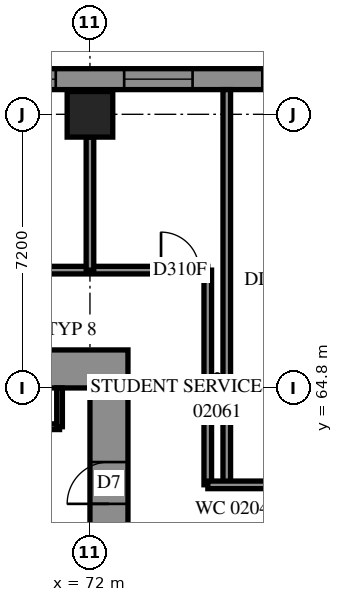
"""IFC4 building model, lengths in metres.
Left out: names, types, materials, properties, quantities, classifications, styles, units other than length and angle.
Written with IfcOpenShell. Run it as: python <this file> out.ifc"""

import sys

from ifc_helpers import new_model, si_unit, direction, frame, frame_2d, origin, origin_2d, place, context, subcontext, project, spatial, polyline, rectangle, outline, extrude, element, fill, save


model = new_model("IFC4")
c1 = context("Model", 3, precision=1e-05, world=origin(), true_north=direction((0.0, 1.0)))
c2 = subcontext(c1, "Body", "Model", "MODEL_VIEW")
j1 = project(units=[si_unit("LENGTHUNIT", "METRE"), si_unit("PLANEANGLEUNIT", "RADIAN")], contexts=[c1])
p1 = place(None, origin())
s1 = spatial("IfcSite", under=j1, at=p1, CompositionType="ELEMENT")
p2 = place(p1, origin())
s2 = spatial("IfcBuilding", under=s1, at=p2, CompositionType="ELEMENT")
p3 = place(p2, frame((0.0, 0.0, 10.2)))
s3 = spatial("IfcBuildingStorey", under=s2, at=p3, CompositionType="ELEMENT", Elevation=10.2)
p4 = place(p3, frame((72.0, 72.0, 0.0), z_axis=(0.0, 0.0, 1.0), x_axis=(1.0, 0.0, 0.0)))
e1 = element("IfcColumn", 1, at=p4, inside=s3, PredefinedType="COLUMN", context=c2, shape_type="SweptSolid", body=[
    extrude(rectangle(XDim=1.2, YDim=1.2, at=origin_2d()), origin(), (0.0, 0.0, 1.0), 3.8),
])
p5 = place(p3, frame((56.6, 65.3, -0.4), z_axis=(0.0, 0.0, 1.0), x_axis=(1.0, 0.0, 0.0)))
e2 = element("IfcWall", 2, at=p5, inside=s3, PredefinedType="SHEAR", context=c2, shape_type="SweptSolid", body=[
    extrude(rectangle(XDim=16.4, YDim=1.0, at=frame_2d((8.2, 0.0))), origin(), (0.0, 0.0, 1.0), 3.5),
])
p6 = place(p5, frame((11.0, 0.0, 0.4)))
e3 = element("IfcOpeningElement", 3, at=p6, cuts=e2, PredefinedType="OPENING", context=c2, shape_type="SweptSolid", body=[
    extrude(rectangle(XDim=0.8, YDim=2.1, at=frame_2d((0.4, 1.05))), frame((0.0, 0.51, 0.0), z_axis=(0.0, -1.0, 0.0), x_axis=(1.0, 0.0, 0.0)), (0.0, 0.0, 1.0), 1.02),
])
p7 = place(p3, frame((72.5, 50.4, -0.4), z_axis=(0.0, 0.0, 1.0), x_axis=(0.0, 1.0, 0.0)))
e4 = element("IfcWall", 4, at=p7, inside=s3, PredefinedType="SHEAR", context=c2, shape_type="SweptSolid", body=[
    extrude(rectangle(XDim=14.4, YDim=1.0, at=frame_2d((7.2, 0.0))), origin(), (0.0, 0.0, 1.0), 3.5),
])
p8 = place(p7, frame((4.55, 0.0, 0.4)))
e5 = element("IfcOpeningElement", 5, at=p8, cuts=e4, PredefinedType="OPENING", context=c2, shape_type="SweptSolid", body=[
    extrude(rectangle(XDim=1.1, YDim=2.1, at=frame_2d((0.55, 1.05))), frame((0.0, 0.51, 0.0), z_axis=(0.0, -1.0, 0.0), x_axis=(1.0, 0.0, 0.0)), (0.0, 0.0, 1.0), 1.02),
])
p9 = place(p7, frame((11.35, 0.0, 0.4)))
e6 = element("IfcOpeningElement", 6, at=p9, cuts=e4, PredefinedType="OPENING", context=c2, shape_type="SweptSolid", body=[
    extrude(rectangle(XDim=1.1, YDim=2.1, at=frame_2d((0.55, 1.05))), frame((0.0, 0.51, 0.0), z_axis=(0.0, -1.0, 0.0), x_axis=(1.0, 0.0, 0.0)), (0.0, 0.0, 1.0), 1.02),
])
p10 = place(p3, frame((79.583, 72.925, 0.0), z_axis=(0.0, 0.0, 1.0), x_axis=(-1.0, 0.0, 0.0)))
e7 = element("IfcWall", 7, at=p10, inside=s3, PredefinedType="SOLIDWALL", context=c2, shape_type="SweptSolid", body=[
    extrude(outline(polyline([(-0.114, -0.275), (79.583, -0.275), (79.033, 0.275), (0.114, 0.275), (-0.114, -0.275)])), origin(), (0.0, 0.0, 1.0), 3.8),
])
p11 = place(p10, frame((1.249, 0.0, 0.7)))
e8 = element("IfcOpeningElement", 8, at=p11, cuts=e7, PredefinedType="OPENING", context=c2, shape_type="SweptSolid", body=[
    extrude(rectangle(XDim=1.8, YDim=2.6, at=frame_2d((0.9, 1.3))), frame((0.0, 0.285, 0.0), z_axis=(0.0, -1.0, 0.0), x_axis=(1.0, 0.0, 0.0)), (0.0, 0.0, 1.0), 0.57),
])
p12 = place(p10, frame((4.883, 0.0, 0.7)))
e9 = element("IfcOpeningElement", 9, at=p12, cuts=e7, PredefinedType="OPENING", context=c2, shape_type="SweptSolid", body=[
    extrude(rectangle(XDim=1.8, YDim=2.6, at=frame_2d((0.9, 1.3))), frame((0.0, 0.285, 0.0), z_axis=(0.0, -1.0, 0.0), x_axis=(1.0, 0.0, 0.0)), (0.0, 0.0, 1.0), 0.57),
])
p13 = place(p10, frame((8.483, 0.0, 0.7)))
e10 = element("IfcOpeningElement", 10, at=p13, cuts=e7, PredefinedType="OPENING", context=c2, shape_type="SweptSolid", body=[
    extrude(rectangle(XDim=1.8, YDim=2.6, at=frame_2d((0.9, 1.3))), frame((0.0, 0.285, 0.0), z_axis=(0.0, -1.0, 0.0), x_axis=(1.0, 0.0, 0.0)), (0.0, 0.0, 1.0), 0.57),
])
p14 = place(p10, frame((12.083, 0.0, 0.7)))
e11 = element("IfcOpeningElement", 11, at=p14, cuts=e7, PredefinedType="OPENING", context=c2, shape_type="SweptSolid", body=[
    extrude(rectangle(XDim=1.8, YDim=2.6, at=frame_2d((0.9, 1.3))), frame((0.0, 0.285, 0.0), z_axis=(0.0, -1.0, 0.0), x_axis=(1.0, 0.0, 0.0)), (0.0, 0.0, 1.0), 0.57),
])
p15 = place(p10, frame((15.683, 0.0, 0.7)))
e12 = element("IfcOpeningElement", 12, at=p15, cuts=e7, PredefinedType="OPENING", context=c2, shape_type="SweptSolid", body=[
    extrude(rectangle(XDim=1.8, YDim=2.6, at=frame_2d((0.9, 1.3))), frame((0.0, 0.285, 0.0), z_axis=(0.0, -1.0, 0.0), x_axis=(1.0, 0.0, 0.0)), (0.0, 0.0, 1.0), 0.57),
])
p16 = place(p10, frame((19.283, 0.0, 0.7)))
e13 = element("IfcOpeningElement", 13, at=p16, cuts=e7, PredefinedType="OPENING", context=c2, shape_type="SweptSolid", body=[
    extrude(rectangle(XDim=1.8, YDim=2.6, at=frame_2d((0.9, 1.3))), frame((0.0, 0.285, 0.0), z_axis=(0.0, -1.0, 0.0), x_axis=(1.0, 0.0, 0.0)), (0.0, 0.0, 1.0), 0.57),
])
p17 = place(p10, frame((22.883, 0.0, 0.7)))
e14 = element("IfcOpeningElement", 14, at=p17, cuts=e7, PredefinedType="OPENING", context=c2, shape_type="SweptSolid", body=[
    extrude(rectangle(XDim=1.8, YDim=2.6, at=frame_2d((0.9, 1.3))), frame((0.0, 0.285, 0.0), z_axis=(0.0, -1.0, 0.0), x_axis=(1.0, 0.0, 0.0)), (0.0, 0.0, 1.0), 0.57),
])
p18 = place(p10, frame((26.483, 0.0, 0.7)))
e15 = element("IfcOpeningElement", 15, at=p18, cuts=e7, PredefinedType="OPENING", context=c2, shape_type="SweptSolid", body=[
    extrude(rectangle(XDim=1.8, YDim=2.6, at=frame_2d((0.9, 1.3))), frame((0.0, 0.285, 0.0), z_axis=(0.0, -1.0, 0.0), x_axis=(1.0, 0.0, 0.0)), (0.0, 0.0, 1.0), 0.57),
])
p19 = place(p10, frame((30.083, 0.0, 0.7)))
e16 = element("IfcOpeningElement", 16, at=p19, cuts=e7, PredefinedType="OPENING", context=c2, shape_type="SweptSolid", body=[
    extrude(rectangle(XDim=1.8, YDim=2.6, at=frame_2d((0.9, 1.3))), frame((0.0, 0.285, 0.0), z_axis=(0.0, -1.0, 0.0), x_axis=(1.0, 0.0, 0.0)), (0.0, 0.0, 1.0), 0.57),
])
p20 = place(p10, frame((33.683, 0.0, 0.7)))
e17 = element("IfcOpeningElement", 17, at=p20, cuts=e7, PredefinedType="OPENING", context=c2, shape_type="SweptSolid", body=[
    extrude(rectangle(XDim=1.8, YDim=2.6, at=frame_2d((0.9, 1.3))), frame((0.0, 0.285, 0.0), z_axis=(0.0, -1.0, 0.0), x_axis=(1.0, 0.0, 0.0)), (0.0, 0.0, 1.0), 0.57),
])
p21 = place(p10, frame((37.283, 0.0, 0.7)))
e18 = element("IfcOpeningElement", 18, at=p21, cuts=e7, PredefinedType="OPENING", context=c2, shape_type="SweptSolid", body=[
    extrude(rectangle(XDim=1.8, YDim=2.6, at=frame_2d((0.9, 1.3))), frame((0.0, 0.285, 0.0), z_axis=(0.0, -1.0, 0.0), x_axis=(1.0, 0.0, 0.0)), (0.0, 0.0, 1.0), 0.57),
])
p22 = place(p10, frame((40.883, 0.0, 0.7)))
e19 = element("IfcOpeningElement", 19, at=p22, cuts=e7, PredefinedType="OPENING", context=c2, shape_type="SweptSolid", body=[
    extrude(rectangle(XDim=1.8, YDim=2.6, at=frame_2d((0.9, 1.3))), frame((0.0, 0.285, 0.0), z_axis=(0.0, -1.0, 0.0), x_axis=(1.0, 0.0, 0.0)), (0.0, 0.0, 1.0), 0.57),
])
p23 = place(p10, frame((44.483, 0.0, 0.7)))
e20 = element("IfcOpeningElement", 20, at=p23, cuts=e7, PredefinedType="OPENING", context=c2, shape_type="SweptSolid", body=[
    extrude(rectangle(XDim=1.8, YDim=2.6, at=frame_2d((0.9, 1.3))), frame((0.0, 0.285, 0.0), z_axis=(0.0, -1.0, 0.0), x_axis=(1.0, 0.0, 0.0)), (0.0, 0.0, 1.0), 0.57),
])
p24 = place(p10, frame((48.083, 0.0, 0.7)))
e21 = element("IfcOpeningElement", 21, at=p24, cuts=e7, PredefinedType="OPENING", context=c2, shape_type="SweptSolid", body=[
    extrude(rectangle(XDim=1.8, YDim=2.6, at=frame_2d((0.9, 1.3))), frame((0.0, 0.285, 0.0), z_axis=(0.0, -1.0, 0.0), x_axis=(1.0, 0.0, 0.0)), (0.0, 0.0, 1.0), 0.57),
])
p25 = place(p10, frame((51.683, 0.0, 0.7)))
e22 = element("IfcOpeningElement", 22, at=p25, cuts=e7, PredefinedType="OPENING", context=c2, shape_type="SweptSolid", body=[
    extrude(rectangle(XDim=1.8, YDim=2.6, at=frame_2d((0.9, 1.3))), frame((0.0, 0.285, 0.0), z_axis=(0.0, -1.0, 0.0), x_axis=(1.0, 0.0, 0.0)), (0.0, 0.0, 1.0), 0.57),
])
p26 = place(p10, frame((55.283, 0.0, 0.7)))
e23 = element("IfcOpeningElement", 23, at=p26, cuts=e7, PredefinedType="OPENING", context=c2, shape_type="SweptSolid", body=[
    extrude(rectangle(XDim=1.8, YDim=2.6, at=frame_2d((0.9, 1.3))), frame((0.0, 0.285, 0.0), z_axis=(0.0, -1.0, 0.0), x_axis=(1.0, 0.0, 0.0)), (0.0, 0.0, 1.0), 0.57),
])
p27 = place(p10, frame((58.883, 0.0, 0.7)))
e24 = element("IfcOpeningElement", 24, at=p27, cuts=e7, PredefinedType="OPENING", context=c2, shape_type="SweptSolid", body=[
    extrude(rectangle(XDim=1.8, YDim=2.6, at=frame_2d((0.9, 1.3))), frame((0.0, 0.285, 0.0), z_axis=(0.0, -1.0, 0.0), x_axis=(1.0, 0.0, 0.0)), (0.0, 0.0, 1.0), 0.57),
])
p28 = place(p10, frame((62.483, 0.0, 0.7)))
e25 = element("IfcOpeningElement", 25, at=p28, cuts=e7, PredefinedType="OPENING", context=c2, shape_type="SweptSolid", body=[
    extrude(rectangle(XDim=1.8, YDim=2.6, at=frame_2d((0.9, 1.3))), frame((0.0, 0.285, 0.0), z_axis=(0.0, -1.0, 0.0), x_axis=(1.0, 0.0, 0.0)), (0.0, 0.0, 1.0), 0.57),
])
p29 = place(p10, frame((66.083, 0.0, 0.7)))
e26 = element("IfcOpeningElement", 26, at=p29, cuts=e7, PredefinedType="OPENING", context=c2, shape_type="SweptSolid", body=[
    extrude(rectangle(XDim=1.8, YDim=2.6, at=frame_2d((0.9, 1.3))), frame((0.0, 0.285, 0.0), z_axis=(0.0, -1.0, 0.0), x_axis=(1.0, 0.0, 0.0)), (0.0, 0.0, 1.0), 0.57),
])
p30 = place(p10, frame((69.683, 0.0, 0.7)))
e27 = element("IfcOpeningElement", 27, at=p30, cuts=e7, PredefinedType="OPENING", context=c2, shape_type="SweptSolid", body=[
    extrude(rectangle(XDim=1.8, YDim=2.6, at=frame_2d((0.9, 1.3))), frame((0.0, 0.285, 0.0), z_axis=(0.0, -1.0, 0.0), x_axis=(1.0, 0.0, 0.0)), (0.0, 0.0, 1.0), 0.57),
])
p31 = place(p10, frame((73.683, 0.0, 0.7)))
e28 = element("IfcOpeningElement", 28, at=p31, cuts=e7, PredefinedType="OPENING", context=c2, shape_type="SweptSolid", body=[
    extrude(rectangle(XDim=1.8, YDim=2.6, at=frame_2d((0.9, 1.3))), frame((0.0, 0.285, 0.0), z_axis=(0.0, -1.0, 0.0), x_axis=(1.0, 0.0, 0.0)), (0.0, 0.0, 1.0), 0.57),
])
p32 = place(p10, frame((76.508, 0.0, 0.7)))
e29 = element("IfcOpeningElement", 29, at=p32, cuts=e7, PredefinedType="OPENING", context=c2, shape_type="SweptSolid", body=[
    extrude(rectangle(XDim=1.8, YDim=2.6, at=frame_2d((0.9, 1.3))), frame((0.0, 0.285, 0.0), z_axis=(0.0, -1.0, 0.0), x_axis=(1.0, 0.0, 0.0)), (0.0, 0.0, 1.0), 0.57),
])
p33 = place(p3, frame((64.95, 63.78, 0.0), z_axis=(0.0, 0.0, 1.0), x_axis=(1.0, 0.0, 0.0)))
e30 = element("IfcWall", 30, at=p33, inside=s3, PredefinedType="PARTITIONING", context=c2, shape_type="SweptSolid", body=[
    extrude(rectangle(XDim=6.25, YDim=0.15, at=frame_2d((3.125, 0.0))), origin(), (0.0, 0.0, 1.0), 3.8),
])
p34 = place(p3, frame((71.2, 63.78, 0.0), z_axis=(0.0, 0.0, 1.0), x_axis=(0.0, 1.0, 0.0)))
e31 = element("IfcWall", 31, at=p34, inside=s3, PredefinedType="PARTITIONING", context=c2, shape_type="SweptSolid", body=[
    extrude(rectangle(XDim=1.02, YDim=0.15, at=frame_2d((0.51, 0.0))), origin(), (0.0, 0.0, 1.0), 3.8),
])
p35 = place(p3, frame((54.5, 67.9, 0.0), z_axis=(0.0, 0.0, 1.0), x_axis=(1.0, 0.0, 0.0)))
e32 = element("IfcWall", 32, at=p35, inside=s3, PredefinedType="PARTITIONING", context=c2, shape_type="SweptSolid", body=[
    extrude(rectangle(XDim=20.6, YDim=0.2, at=frame_2d((10.3, 0.0))), origin(), (0.0, 0.0, 1.0), 3.8),
])
p36 = place(p35, frame((0.23, 0.0, 0.0)))
e33 = element("IfcOpeningElement", 33, at=p36, cuts=e32, PredefinedType="OPENING", context=c2, shape_type="SweptSolid", body=[
    extrude(rectangle(XDim=1.0, YDim=2.1, at=frame_2d((0.5, 1.05))), frame((0.0, 0.11, 0.0), z_axis=(0.0, -1.0, 0.0), x_axis=(1.0, 0.0, 0.0)), (0.0, 0.0, 1.0), 0.22),
])
p37 = place(p35, frame((19.37, 0.0, 0.0)))
e34 = element("IfcOpeningElement", 34, at=p37, cuts=e32, PredefinedType="OPENING", context=c2, shape_type="SweptSolid", body=[
    extrude(rectangle(XDim=1.0, YDim=2.1, at=frame_2d((0.5, 1.05))), frame((0.0, 0.11, 0.0), z_axis=(0.0, -1.0, 0.0), x_axis=(1.0, 0.0, 0.0)), (0.0, 0.0, 1.0), 0.22),
])
p38 = place(p35, frame((6.657, 0.0, 0.0)))
e35 = element("IfcOpeningElement", 35, at=p38, cuts=e32, PredefinedType="OPENING", context=c2, shape_type="SweptSolid", body=[
    extrude(rectangle(XDim=1.0, YDim=2.1, at=frame_2d((0.5, 1.05))), frame((0.0, 0.11, 0.0), z_axis=(0.0, -1.0, 0.0), x_axis=(1.0, 0.0, 0.0)), (0.0, 0.0, 1.0), 0.22),
])
p39 = place(p35, frame((13.857, 0.0, 0.0)))
e36 = element("IfcOpeningElement", 36, at=p39, cuts=e32, PredefinedType="OPENING", context=c2, shape_type="SweptSolid", body=[
    extrude(rectangle(XDim=1.0, YDim=2.1, at=frame_2d((0.5, 1.05))), frame((0.0, 0.11, 0.0), z_axis=(0.0, -1.0, 0.0), x_axis=(1.0, 0.0, 0.0)), (0.0, 0.0, 1.0), 0.22),
])
p40 = place(p3, frame((75.6, 62.25, 0.0), z_axis=(0.0, 0.0, 1.0), x_axis=(0.0, 1.0, 0.0)))
e37 = element("IfcWall", 37, at=p40, inside=s3, PredefinedType="PARTITIONING", context=c2, shape_type="SweptSolid", body=[
    extrude(rectangle(XDim=10.4, YDim=0.2, at=frame_2d((5.2, 0.0))), origin(), (0.0, 0.0, 1.0), 3.8),
])
p41 = place(p3, frame((75.1, 62.252, 0.0), z_axis=(0.0, 0.0, 1.0), x_axis=(0.0, 1.0, 0.0)))
e38 = element("IfcWall", 38, at=p41, inside=s3, PredefinedType="PARTITIONING", context=c2, shape_type="SweptSolid", body=[
    extrude(rectangle(XDim=5.648, YDim=0.2, at=frame_2d((2.824, 0.0))), origin(), (0.0, 0.0, 1.0), 3.8),
])
p42 = place(p3, frame((75.102, 62.25, 0.0), z_axis=(0.0, 0.0, 1.0), x_axis=(1.0, 0.0, 0.0)))
e39 = element("IfcWall", 39, at=p42, inside=s3, PredefinedType="PARTITIONING", context=c2, shape_type="SweptSolid", body=[
    extrude(rectangle(XDim=4.098, YDim=0.2, at=frame_2d((2.049, 0.0))), origin(), (0.0, 0.0, 1.0), 3.8),
])
p43 = place(p3, frame((72.0, 67.9, 0.0), z_axis=(0.0, 0.0, 1.0), x_axis=(0.0, 1.0, 0.0)))
e40 = element("IfcWall", 40, at=p43, inside=s3, PredefinedType="PARTITIONING", context=c2, shape_type="SweptSolid", body=[
    extrude(rectangle(XDim=3.5, YDim=0.2, at=frame_2d((1.75, 0.0))), origin(), (0.0, 0.0, 1.0), 3.8),
])
p44 = place(p11, origin())
e41 = element("IfcWindow", 41, at=p44, inside=s3, PartitioningType="SINGLE_PANEL", PredefinedType="WINDOW", context=c2, shape_type="SweptSolid", body=[
    extrude(rectangle(XDim=1.8, YDim=2.6, at=frame_2d((0.9, 1.3))), frame((0.0, 0.155, 0.0), z_axis=(0.0, -1.0, 0.0), x_axis=(1.0, 0.0, 0.0)), (0.0, 0.0, 1.0), 0.06),
])
fill(e8, e41)
p45 = place(p12, origin())
e42 = element("IfcWindow", 42, at=p45, inside=s3, PartitioningType="SINGLE_PANEL", PredefinedType="WINDOW", context=c2, shape_type="SweptSolid", body=[
    extrude(rectangle(XDim=1.8, YDim=2.6, at=frame_2d((0.9, 1.3))), frame((0.0, 0.155, 0.0), z_axis=(0.0, -1.0, 0.0), x_axis=(1.0, 0.0, 0.0)), (0.0, 0.0, 1.0), 0.06),
])
fill(e9, e42)
p46 = place(p13, origin())
e43 = element("IfcWindow", 43, at=p46, inside=s3, PartitioningType="SINGLE_PANEL", PredefinedType="WINDOW", context=c2, shape_type="SweptSolid", body=[
    extrude(rectangle(XDim=1.8, YDim=2.6, at=frame_2d((0.9, 1.3))), frame((0.0, 0.155, 0.0), z_axis=(0.0, -1.0, 0.0), x_axis=(1.0, 0.0, 0.0)), (0.0, 0.0, 1.0), 0.06),
])
fill(e10, e43)
p47 = place(p9, origin())
e44 = element("IfcDoor", 44, at=p47, inside=s3, OperationType="SINGLE_SWING_RIGHT", PredefinedType="DOOR", context=c2, shape_type="SweptSolid", body=[
    extrude(rectangle(XDim=1.1, YDim=2.1, at=frame_2d((0.55, 1.05))), frame((0.0, 0.025, 0.0), z_axis=(0.0, -1.0, 0.0), x_axis=(1.0, 0.0, 0.0)), (0.0, 0.0, 1.0), 0.05),
])
fill(e6, e44)
p48 = place(p37, origin())
e45 = element("IfcDoor", 45, at=p48, inside=s3, OperationType="SINGLE_SWING_RIGHT", PredefinedType="DOOR", context=c2, shape_type="SweptSolid", body=[
    extrude(rectangle(XDim=1.0, YDim=2.1, at=frame_2d((0.5, 1.05))), frame((0.0, 0.025, 0.0), z_axis=(0.0, -1.0, 0.0), x_axis=(1.0, 0.0, 0.0)), (0.0, 0.0, 1.0), 0.05),
])
fill(e34, e45)
save(model, sys.argv[1])
